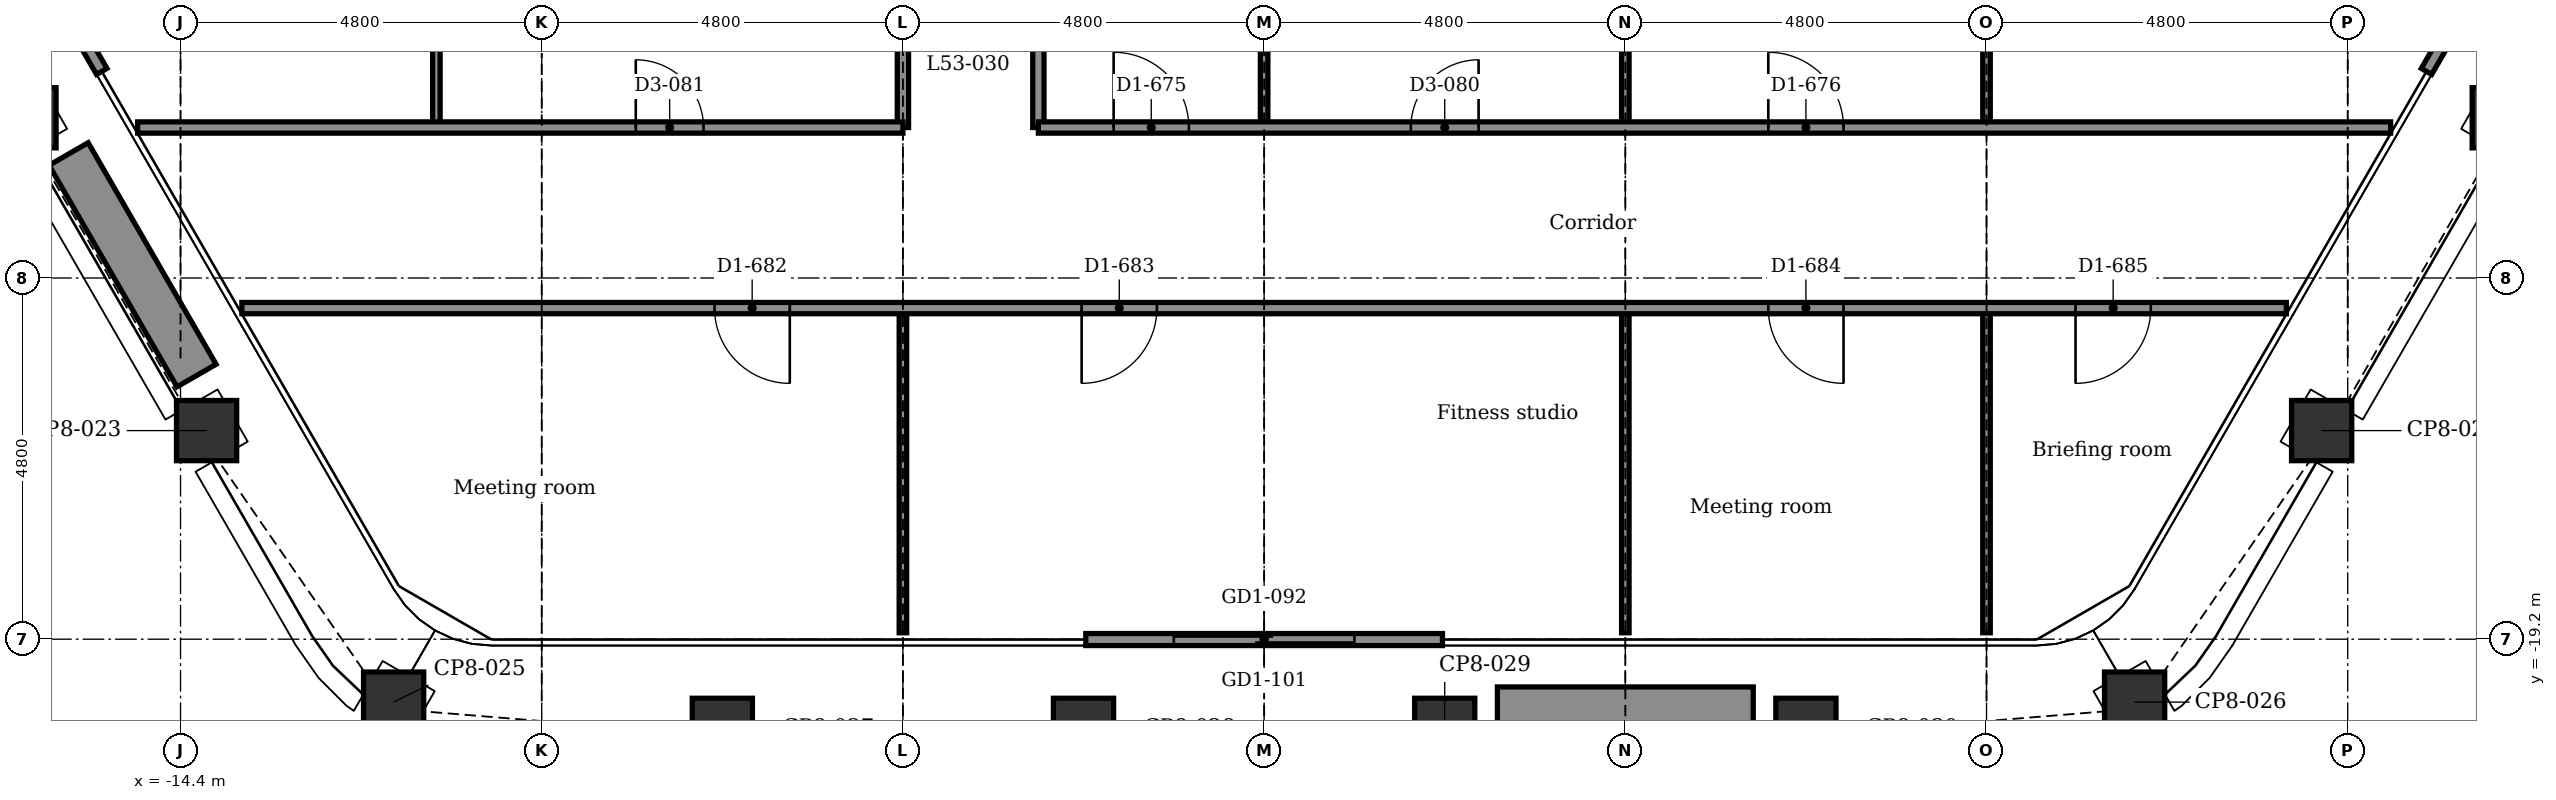
"""IFC4 building model, lengths in metres.
Left out: names, types, materials, properties, quantities, classifications, styles, units other than length and angle.
Written with IfcOpenShell. Run it as: python <this file> out.ifc"""

import sys

from ifc_helpers import new_model, si_unit, direction, frame, frame_2d, origin, origin_2d, place, context, subcontext, project, spatial, rectangle, extrude, element, fill, save


model = new_model("IFC4")
c1 = context("Model", 3, precision=1e-05, world=origin(), true_north=direction((0.0, 1.0)))
c2 = subcontext(c1, "Body", "Model", "MODEL_VIEW")
j1 = project(units=[si_unit("LENGTHUNIT", "METRE"), si_unit("PLANEANGLEUNIT", "RADIAN")], contexts=[c1])
p1 = place(None, origin())
s1 = spatial("IfcSite", under=j1, at=p1, CompositionType="ELEMENT")
p2 = place(p1, origin())
s2 = spatial("IfcBuilding", under=s1, at=p2, CompositionType="ELEMENT")
p3 = place(p2, frame((0.0, 0.0, 242.3)))
s3 = spatial("IfcBuildingStorey", under=s2, at=p3, CompositionType="ELEMENT", Elevation=242.3)
for number, where, z_axis, x_axis in (
    (1, (16.454, -12.271, -0.15), (0.0, 0.0, 1.0), (0.5, 0.866, 0.0)),
    (2, (14.054, -16.428, -0.15), (0.0, 0.0, 1.0), (0.5, 0.866, 0.0)),
    (3, (11.568, -20.036, -0.15), (0.0, 0.0, 1.0), (0.866, 0.5, 0.0)),
    (4, (7.2, -20.385, -0.15), (0.0, 0.0, 1.0), (1.0, 0.0, 0.0)),
    (5, (2.4, -20.385, -0.15), (0.0, 0.0, 1.0), (1.0, 0.0, 0.0)),
    (6, (-2.4, -20.385, -0.15), (0.0, 0.0, 1.0), (1.0, 0.0, 0.0)),
    (7, (-7.2, -20.385, -0.15), (0.0, 0.0, 1.0), (1.0, 0.0, 0.0)),
    (8, (-11.568, -20.036, -0.15), (0.0, 0.0, 1.0), (0.5, 0.866, 0.0)),
    (9, (-14.054, -16.428, -0.15), (0.0, 0.0, 1.0), (0.866, 0.5, 0.0)),
    (10, (-16.454, -12.271, -0.15), (0.0, 0.0, 1.0), (0.866, 0.5, 0.0)),
):
    element("IfcColumn", number, at=place(p3, frame(where, z_axis=z_axis, x_axis=x_axis)), inside=s3, PredefinedType="COLUMN", context=c2, shape_type="SweptSolid", body=[
        extrude(rectangle(XDim=0.8, YDim=0.8, at=origin_2d()), origin(), (0.0, 0.0, 1.0), 3.9),
    ])
p4 = place(p3, frame((17.817, -7.55, 0.0), z_axis=(0.0, 0.0, 1.0), x_axis=(-0.499978080042, -0.866038058908, 0.0)))
e11 = element("IfcWall", 11, at=p4, inside=s3, PredefinedType="PARTITIONING", context=c2, shape_type="SweptSolid", body=[
    extrude(rectangle(XDim=4.74, YDim=0.16, at=frame_2d((2.37, 0.0))), origin(), (0.0, 0.0, 1.0), 3.75),
])
p5 = place(p4, frame((1.17, 0.0, 0.0)))
e12 = element("IfcOpeningElement", 12, at=p5, cuts=e11, PredefinedType="OPENING", context=c2, shape_type="SweptSolid", body=[
    extrude(rectangle(XDim=2.4, YDim=2.4, at=frame_2d((1.2, 1.2))), frame((0.0, 0.09, 0.0), z_axis=(0.0, -1.0, 0.0), x_axis=(1.0, 0.0, 0.0)), (0.0, 0.0, 1.0), 0.18),
])
p6 = place(p3, frame((2.37, -19.205, 0.0), z_axis=(0.0, 0.0, 1.0), x_axis=(-1.0, 0.0, 0.0)))
e13 = element("IfcWall", 13, at=p6, inside=s3, PredefinedType="PARTITIONING", context=c2, shape_type="SweptSolid", body=[
    extrude(rectangle(XDim=4.74, YDim=0.16, at=frame_2d((2.37, 0.0))), origin(), (0.0, 0.0, 1.0), 3.75),
])
p7 = place(p6, frame((1.17, 0.0, 0.0)))
e14 = element("IfcOpeningElement", 14, at=p7, cuts=e13, PredefinedType="OPENING", context=c2, shape_type="SweptSolid", body=[
    extrude(rectangle(XDim=2.4, YDim=2.4, at=frame_2d((1.2, 1.2))), frame((0.0, 0.09, 0.0), z_axis=(0.0, -1.0, 0.0), x_axis=(1.0, 0.0, 0.0)), (0.0, 0.0, 1.0), 0.18),
])
p8 = place(p3, frame((-15.447, -11.655, 0.0), z_axis=(0.0, 0.0, 1.0), x_axis=(-0.499978080042, 0.866038058908, 0.0)))
e15 = element("IfcWall", 15, at=p8, inside=s3, PredefinedType="PARTITIONING", context=c2, shape_type="SweptSolid", body=[
    extrude(rectangle(XDim=4.74, YDim=0.16, at=frame_2d((2.37, 0.0))), origin(), (0.0, 0.0, 1.0), 3.75),
])
p9 = place(p8, frame((1.17, 0.0, 0.0)))
e16 = element("IfcOpeningElement", 16, at=p9, cuts=e15, PredefinedType="OPENING", context=c2, shape_type="SweptSolid", body=[
    extrude(rectangle(XDim=2.4, YDim=2.4, at=frame_2d((1.2, 1.2))), frame((0.0, 0.09, 0.0), z_axis=(0.0, -1.0, 0.0), x_axis=(1.0, 0.0, 0.0)), (0.0, 0.0, 1.0), 0.18),
])
p10 = place(p3, frame((6.5, -20.135, 0.0), z_axis=(0.0, 0.0, 1.0), x_axis=(-1.0, 0.0, 0.0)))
e17 = element("IfcWall", 17, at=p10, inside=s3, PredefinedType="USERDEFINED", context=c2, shape_type="SweptSolid", body=[
    extrude(rectangle(XDim=3.4, YDim=0.6, at=frame_2d((1.7, 0.0))), origin(), (0.0, 0.0, 1.0), 0.7),
])
p11 = place(p3, frame((-14.187, -15.697, 0.0), z_axis=(0.0, 0.0, 1.0), x_axis=(-0.499977295307, 0.866038511948, 0.0)))
e18 = element("IfcWall", 18, at=p11, inside=s3, PredefinedType="USERDEFINED", context=c2, shape_type="SweptSolid", body=[
    extrude(rectangle(XDim=3.4, YDim=0.6, at=frame_2d((1.7, 0.0))), origin(), (0.0, 0.0, 1.0), 0.7),
])
p12 = place(p3, frame((9.6, -19.115, 0.0), z_axis=(0.0, 0.0, 1.0), x_axis=(0.0, 1.0, 0.0)))
e19 = element("IfcWall", 19, at=p12, inside=s3, PredefinedType="PARTITIONING", context=c2, shape_type="SweptSolid", body=[
    extrude(rectangle(XDim=4.314, YDim=0.1, at=frame_2d((2.157, 0.0))), origin(), (0.0, 0.0, 1.0), 3.293),
])
p13 = place(p3, frame((9.6, -12.4, 0.0), z_axis=(0.0, 0.0, 1.0), x_axis=(0.0, 1.0, 0.0)))
e20 = element("IfcWall", 20, at=p13, inside=s3, PredefinedType="PARTITIONING", context=c2, shape_type="SweptSolid", body=[
    extrude(rectangle(XDim=2.25, YDim=0.1, at=frame_2d((1.125, 0.0))), origin(), (0.0, 0.0, 1.0), 3.293),
])
p14 = place(p3, frame((4.8, -19.115, 0.0), z_axis=(0.0, 0.0, 1.0), x_axis=(0.0, 1.0, 0.0)))
e21 = element("IfcWall", 21, at=p14, inside=s3, PredefinedType="PARTITIONING", context=c2, shape_type="SweptSolid", body=[
    extrude(rectangle(XDim=4.314, YDim=0.1, at=frame_2d((2.157, 0.0))), origin(), (0.0, 0.0, 1.0), 3.293),
])
p15 = place(p3, frame((4.8, -12.4, 0.0), z_axis=(0.0, 0.0, 1.0), x_axis=(0.0, 1.0, 0.0)))
e22 = element("IfcWall", 22, at=p15, inside=s3, PredefinedType="PARTITIONING", context=c2, shape_type="SweptSolid", body=[
    extrude(rectangle(XDim=2.25, YDim=0.1, at=frame_2d((1.125, 0.0))), origin(), (0.0, 0.0, 1.0), 3.293),
])
p16 = place(p3, frame((0.0, -12.4, 0.0), z_axis=(0.0, 0.0, 1.0), x_axis=(0.0, 1.0, 0.0)))
e23 = element("IfcWall", 23, at=p16, inside=s3, PredefinedType="PARTITIONING", context=c2, shape_type="SweptSolid", body=[
    extrude(rectangle(XDim=2.525, YDim=0.1, at=frame_2d((1.262, 0.0))), origin(), (0.0, 0.0, 1.0), 3.217),
])
p17 = place(p3, frame((-3.0, -12.4, 0.0), z_axis=(0.0, 0.0, 1.0), x_axis=(0.0, 1.0, 0.0)))
e24 = element("IfcWall", 24, at=p17, inside=s3, PredefinedType="PARTITIONING", context=c2, shape_type="SweptSolid", body=[
    extrude(rectangle(XDim=2.525, YDim=0.15, at=frame_2d((1.262, 0.0))), origin(), (0.0, 0.0, 1.0), 3.75),
])
p18 = place(p3, frame((-4.8, -19.115, 0.0), z_axis=(0.0, 0.0, 1.0), x_axis=(0.0, 1.0, 0.0)))
e25 = element("IfcWall", 25, at=p18, inside=s3, PredefinedType="PARTITIONING", context=c2, shape_type="SweptSolid", body=[
    extrude(rectangle(XDim=4.314, YDim=0.1, at=frame_2d((2.157, 0.0))), origin(), (0.0, 0.0, 1.0), 3.217),
])
p19 = place(p3, frame((-4.8, -12.4, 0.0), z_axis=(0.0, 0.0, 1.0), x_axis=(0.0, 1.0, 0.0)))
e26 = element("IfcWall", 26, at=p19, inside=s3, PredefinedType="PARTITIONING", context=c2, shape_type="SweptSolid", body=[
    extrude(rectangle(XDim=2.525, YDim=0.15, at=frame_2d((1.262, 0.0))), origin(), (0.0, 0.0, 1.0), 3.217),
])
p20 = place(p3, frame((-11.0, -12.4, 0.0), z_axis=(0.0, 0.0, 1.0), x_axis=(0.0, 1.0, 0.0)))
e27 = element("IfcWall", 27, at=p20, inside=s3, PredefinedType="PARTITIONING", context=c2, shape_type="SweptSolid", body=[
    extrude(rectangle(XDim=2.4, YDim=0.1, at=frame_2d((1.2, 0.0))), origin(), (0.0, 0.0, 1.0), 3.75),
])
p21 = place(p3, frame((-13.585, -14.8, 0.0), z_axis=(0.0, 0.0, 1.0), x_axis=(1.0, 0.0, 0.0)))
e28 = element("IfcWall", 28, at=p21, inside=s3, PredefinedType="PARTITIONING", context=c2, shape_type="SweptSolid", body=[
    extrude(rectangle(XDim=27.169, YDim=0.15, at=frame_2d((13.585, 0.0))), origin(), (0.0, 0.0, 1.0), 3.75),
])
p22 = place(p21, frame((6.281, 0.0, 0.0)))
e29 = element("IfcOpeningElement", 29, at=p22, cuts=e28, PredefinedType="OPENING", context=c2, shape_type="SweptSolid", body=[
    extrude(rectangle(XDim=1.0, YDim=2.1, at=frame_2d((0.5, 1.05))), frame((0.0, 0.085, 0.0), z_axis=(0.0, -1.0, 0.0), x_axis=(1.0, 0.0, 0.0)), (0.0, 0.0, 1.0), 0.17),
])
p23 = place(p21, frame((11.16, 0.0, 0.0)))
e30 = element("IfcOpeningElement", 30, at=p23, cuts=e28, PredefinedType="OPENING", context=c2, shape_type="SweptSolid", body=[
    extrude(rectangle(XDim=1.0, YDim=2.1, at=frame_2d((0.5, 1.05))), frame((0.0, 0.085, 0.0), z_axis=(0.0, -1.0, 0.0), x_axis=(1.0, 0.0, 0.0)), (0.0, 0.0, 1.0), 0.17),
])
p24 = place(p21, frame((20.285, 0.0, 0.0)))
e31 = element("IfcOpeningElement", 31, at=p24, cuts=e28, PredefinedType="OPENING", context=c2, shape_type="SweptSolid", body=[
    extrude(rectangle(XDim=1.0, YDim=2.1, at=frame_2d((0.5, 1.05))), frame((0.0, 0.085, 0.0), z_axis=(0.0, -1.0, 0.0), x_axis=(1.0, 0.0, 0.0)), (0.0, 0.0, 1.0), 0.17),
])
p25 = place(p21, frame((24.368, 0.0, 0.0)))
e32 = element("IfcOpeningElement", 32, at=p25, cuts=e28, PredefinedType="OPENING", context=c2, shape_type="SweptSolid", body=[
    extrude(rectangle(XDim=1.0, YDim=2.1, at=frame_2d((0.5, 1.05))), frame((0.0, 0.085, 0.0), z_axis=(0.0, -1.0, 0.0), x_axis=(1.0, 0.0, 0.0)), (0.0, 0.0, 1.0), 0.17),
])
p26 = place(p3, frame((-14.97, -12.4, 0.0), z_axis=(0.0, 0.0, 1.0), x_axis=(1.0, 0.0, 0.0)))
e33 = element("IfcWall", 33, at=p26, inside=s3, PredefinedType="PARTITIONING", context=c2, shape_type="SweptSolid", body=[
    extrude(rectangle(XDim=10.17, YDim=0.15, at=frame_2d((5.085, 0.0))), origin(), (0.0, 0.0, 1.0), 3.75),
])
p27 = place(p26, frame((6.62, 0.0, 0.0)))
e34 = element("IfcOpeningElement", 34, at=p27, cuts=e33, PredefinedType="OPENING", context=c2, shape_type="SweptSolid", body=[
    extrude(rectangle(XDim=0.9, YDim=2.1, at=frame_2d((0.45, 1.05))), frame((0.0, 0.085, 0.0), z_axis=(0.0, -1.0, 0.0), x_axis=(1.0, 0.0, 0.0)), (0.0, 0.0, 1.0), 0.17),
])
p28 = place(p3, frame((-3.0, -12.4, 0.0), z_axis=(0.0, 0.0, 1.0), x_axis=(1.0, 0.0, 0.0)))
e35 = element("IfcWall", 35, at=p28, inside=s3, PredefinedType="PARTITIONING", context=c2, shape_type="SweptSolid", body=[
    extrude(rectangle(XDim=17.97, YDim=0.15, at=frame_2d((8.985, 0.0))), origin(), (0.0, 0.0, 1.0), 3.75),
])
p29 = place(p28, frame((1.0, 0.0, 0.0)))
e36 = element("IfcOpeningElement", 36, at=p29, cuts=e35, PredefinedType="OPENING", context=c2, shape_type="SweptSolid", body=[
    extrude(rectangle(XDim=1.0, YDim=2.1, at=frame_2d((0.5, 1.05))), frame((0.0, 0.085, 0.0), z_axis=(0.0, -1.0, 0.0), x_axis=(1.0, 0.0, 0.0)), (0.0, 0.0, 1.0), 0.17),
])
p30 = place(p28, frame((4.95, 0.0, 0.0)))
e37 = element("IfcOpeningElement", 37, at=p30, cuts=e35, PredefinedType="OPENING", context=c2, shape_type="SweptSolid", body=[
    extrude(rectangle(XDim=0.9, YDim=2.1, at=frame_2d((0.45, 1.05))), frame((0.0, 0.085, 0.0), z_axis=(0.0, -1.0, 0.0), x_axis=(1.0, 0.0, 0.0)), (0.0, 0.0, 1.0), 0.17),
])
p31 = place(p28, frame((9.7, 0.0, 0.0)))
e38 = element("IfcOpeningElement", 38, at=p31, cuts=e35, PredefinedType="OPENING", context=c2, shape_type="SweptSolid", body=[
    extrude(rectangle(XDim=1.0, YDim=2.1, at=frame_2d((0.5, 1.05))), frame((0.0, 0.085, 0.0), z_axis=(0.0, -1.0, 0.0), x_axis=(1.0, 0.0, 0.0)), (0.0, 0.0, 1.0), 0.17),
])
p32 = place(p7, origin())
e39 = element("IfcDoor", 39, at=p32, inside=s3, OperationType="DOUBLE_DOOR_SLIDING", PredefinedType="DOOR", context=c2, shape_type="SweptSolid", body=[
    extrude(rectangle(XDim=2.4, YDim=2.4, at=frame_2d((1.2, 1.2))), frame((0.0, 0.025, 0.0), z_axis=(0.0, -1.0, 0.0), x_axis=(1.0, 0.0, 0.0)), (0.0, 0.0, 1.0), 0.05),
])
fill(e14, e39)
p33 = place(p29, origin())
e40 = element("IfcDoor", 40, at=p33, inside=s3, OperationType="SINGLE_SWING_LEFT", PredefinedType="DOOR", context=c2, shape_type="SweptSolid", body=[
    extrude(rectangle(XDim=1.0, YDim=2.1, at=frame_2d((0.5, 1.05))), frame((0.0, 0.025, 0.0), z_axis=(0.0, -1.0, 0.0), x_axis=(1.0, 0.0, 0.0)), (0.0, 0.0, 1.0), 0.05),
])
fill(e36, e40)
p34 = place(p30, origin())
e41 = element("IfcDoor", 41, at=p34, inside=s3, OperationType="SINGLE_SWING_RIGHT", PredefinedType="DOOR", context=c2, shape_type="SweptSolid", body=[
    extrude(rectangle(XDim=0.9, YDim=2.1, at=frame_2d((0.45, 1.05))), frame((0.0, 0.025, 0.0), z_axis=(0.0, -1.0, 0.0), x_axis=(1.0, 0.0, 0.0)), (0.0, 0.0, 1.0), 0.05),
])
fill(e37, e41)
p35 = place(p31, origin())
e42 = element("IfcDoor", 42, at=p35, inside=s3, OperationType="SINGLE_SWING_LEFT", PredefinedType="DOOR", context=c2, shape_type="SweptSolid", body=[
    extrude(rectangle(XDim=1.0, YDim=2.1, at=frame_2d((0.5, 1.05))), frame((0.0, 0.025, 0.0), z_axis=(0.0, -1.0, 0.0), x_axis=(1.0, 0.0, 0.0)), (0.0, 0.0, 1.0), 0.05),
])
fill(e38, e42)
p36 = place(p27, origin())
e43 = element("IfcDoor", 43, at=p36, inside=s3, OperationType="SINGLE_SWING_LEFT", PredefinedType="DOOR", context=c2, shape_type="SweptSolid", body=[
    extrude(rectangle(XDim=0.9, YDim=2.1, at=frame_2d((0.45, 1.05))), frame((0.0, 0.025, 0.0), z_axis=(0.0, -1.0, 0.0), x_axis=(1.0, 0.0, 0.0)), (0.0, 0.0, 1.0), 0.05),
])
fill(e34, e43)
p37 = place(p22, frame((1.0, 0.0, 0.0), z_axis=(0.0, 0.0, 1.0), x_axis=(-1.0, 0.0, 0.0)))
e44 = element("IfcDoor", 44, at=p37, inside=s3, OperationType="SINGLE_SWING_RIGHT", PredefinedType="DOOR", context=c2, shape_type="SweptSolid", body=[
    extrude(rectangle(XDim=1.0, YDim=2.1, at=frame_2d((0.5, 1.05))), frame((0.0, 0.025, 0.0), z_axis=(0.0, -1.0, 0.0), x_axis=(1.0, 0.0, 0.0)), (0.0, 0.0, 1.0), 0.05),
])
fill(e29, e44)
p38 = place(p23, frame((1.0, 0.0, 0.0), z_axis=(0.0, 0.0, 1.0), x_axis=(-1.0, 0.0, 0.0)))
e45 = element("IfcDoor", 45, at=p38, inside=s3, OperationType="SINGLE_SWING_LEFT", PredefinedType="DOOR", context=c2, shape_type="SweptSolid", body=[
    extrude(rectangle(XDim=1.0, YDim=2.1, at=frame_2d((0.5, 1.05))), frame((0.0, 0.025, 0.0), z_axis=(0.0, -1.0, 0.0), x_axis=(1.0, 0.0, 0.0)), (0.0, 0.0, 1.0), 0.05),
])
fill(e30, e45)
p39 = place(p24, frame((1.0, 0.0, 0.0), z_axis=(0.0, 0.0, 1.0), x_axis=(-1.0, 0.0, 0.0)))
e46 = element("IfcDoor", 46, at=p39, inside=s3, OperationType="SINGLE_SWING_RIGHT", PredefinedType="DOOR", context=c2, shape_type="SweptSolid", body=[
    extrude(rectangle(XDim=1.0, YDim=2.1, at=frame_2d((0.5, 1.05))), frame((0.0, 0.025, 0.0), z_axis=(0.0, -1.0, 0.0), x_axis=(1.0, 0.0, 0.0)), (0.0, 0.0, 1.0), 0.05),
])
fill(e31, e46)
p40 = place(p25, frame((1.0, 0.0, 0.0), z_axis=(0.0, 0.0, 1.0), x_axis=(-1.0, 0.0, 0.0)))
e47 = element("IfcDoor", 47, at=p40, inside=s3, OperationType="SINGLE_SWING_LEFT", PredefinedType="DOOR", context=c2, shape_type="SweptSolid", body=[
    extrude(rectangle(XDim=1.0, YDim=2.1, at=frame_2d((0.5, 1.05))), frame((0.0, 0.025, 0.0), z_axis=(0.0, -1.0, 0.0), x_axis=(1.0, 0.0, 0.0)), (0.0, 0.0, 1.0), 0.05),
])
fill(e32, e47)
save(model, sys.argv[1])
